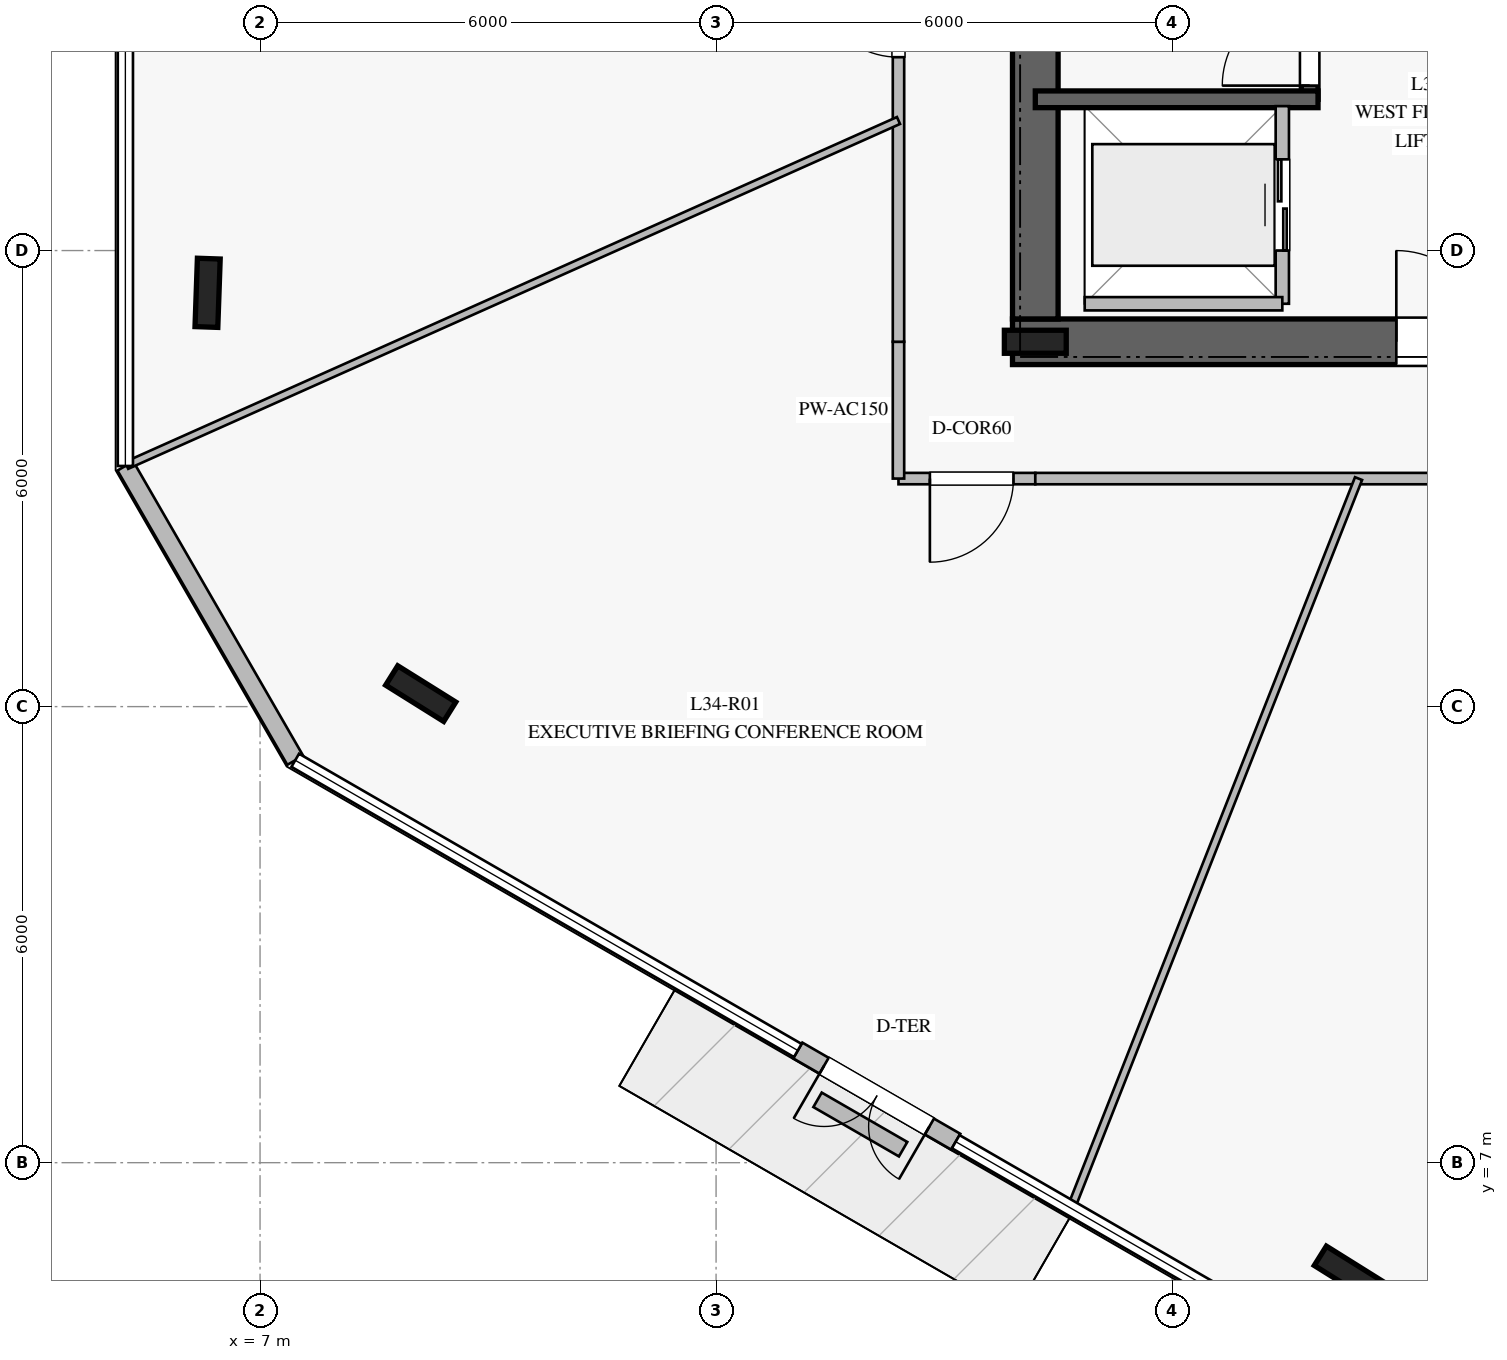
"""IFC4 building model, lengths in metres.
Left out: names, types, materials, properties, quantities, classifications, styles, units other than length and angle.
Written with IfcOpenShell. Run it as: python <this file> out.ifc"""

import sys

from ifc_helpers import new_model, si_unit, direction, frame, frame_2d, origin, origin_2d, place, context, subcontext, project, spatial, rectangle, i_section, extrude, element, fill, save


model = new_model("IFC4")
c1 = context("Model", 3, precision=1e-05, world=origin(), true_north=direction((0.0, 1.0)))
c2 = subcontext(c1, "Body", "Model", "MODEL_VIEW")
j1 = project(units=[si_unit("LENGTHUNIT", "METRE"), si_unit("PLANEANGLEUNIT", "RADIAN")], contexts=[c1])
p1 = place(None, origin())
s1 = spatial("IfcSite", under=j1, at=p1, CompositionType="ELEMENT")
p2 = place(p1, origin())
s2 = spatial("IfcBuilding", under=s1, at=p2, CompositionType="ELEMENT")
p3 = place(p2, frame((0.0, 0.0, 142.4)))
s3 = spatial("IfcBuildingStorey", under=s2, at=p3, CompositionType="ELEMENT", Elevation=142.4)
p4 = place(p3, frame((16.9, 17.8, 0.0), z_axis=(0.0, 0.0, 1.0), x_axis=(1.0, 0.0, 0.0)))
e1 = element("IfcWall", 1, at=p4, inside=s3, PredefinedType="SHEAR", context=c2, shape_type="SweptSolid", body=[
    extrude(rectangle(XDim=16.2, YDim=0.6, at=frame_2d((8.1, 0.0))), origin(), (0.0, 0.0, 1.0), 3.76),
])
p5 = place(p4, frame((5.05, 0.0, 0.0)))
e2 = element("IfcOpeningElement", 2, at=p5, cuts=e1, PredefinedType="OPENING", context=c2, shape_type="SweptSolid", body=[
    extrude(rectangle(XDim=1.2, YDim=2.25, at=frame_2d((0.6, 1.125))), frame((0.0, 0.31, 0.0), z_axis=(0.0, -1.0, 0.0), x_axis=(1.0, 0.0, 0.0)), (0.0, 0.0, 1.0), 0.62),
])
p6 = place(p4, frame((14.0, 0.0, 0.0)))
e3 = element("IfcOpeningElement", 3, at=p6, cuts=e1, PredefinedType="OPENING", context=c2, shape_type="SweptSolid", body=[
    extrude(rectangle(XDim=0.9, YDim=2.1, at=frame_2d((0.45, 1.05))), frame((0.0, 0.31, 0.0), z_axis=(0.0, -1.0, 0.0), x_axis=(1.0, 0.0, 0.0)), (0.0, 0.0, 1.0), 0.62),
])
p7 = place(p4, frame((9.25, 0.0, 0.0)))
e4 = element("IfcOpeningElement", 4, at=p7, cuts=e1, PredefinedType="OPENING", context=c2, shape_type="SweptSolid", body=[
    extrude(rectangle(XDim=1.1, YDim=2.2, at=frame_2d((0.55, 1.1))), frame((0.0, 0.31, 0.0), z_axis=(0.0, -1.0, 0.0), x_axis=(1.0, 0.0, 0.0)), (0.0, 0.0, 1.0), 0.62),
])
p8 = place(p3, frame((17.2, 31.9, 0.0), z_axis=(0.0, 0.0, 1.0), x_axis=(0.0, -1.0, 0.0)))
e5 = element("IfcWall", 5, at=p8, inside=s3, PredefinedType="SHEAR", context=c2, shape_type="SweptSolid", body=[
    extrude(rectangle(XDim=13.8, YDim=0.6, at=frame_2d((6.9, 0.0))), origin(), (0.0, 0.0, 1.0), 3.76),
])
p9 = place(p8, frame((2.05, 0.0, 0.0)))
e6 = element("IfcOpeningElement", 6, at=p9, cuts=e5, PredefinedType="OPENING", context=c2, shape_type="SweptSolid", body=[
    extrude(rectangle(XDim=1.5, YDim=2.2, at=frame_2d((0.75, 1.1))), frame((0.0, 0.31, 0.0), z_axis=(0.0, -1.0, 0.0), x_axis=(1.0, 0.0, 0.0)), (0.0, 0.0, 1.0), 0.62),
])
p10 = place(p3, frame((17.2, 17.8, 0.0), z_axis=(0.0, 0.0, 1.0), x_axis=(1.0, 0.0, 0.0)))
e7 = element("IfcColumn", 7, at=p10, inside=s3, PredefinedType="COLUMN", context=c2, shape_type="SweptSolid", body=[
    extrude(i_section(OverallWidth=0.303, OverallDepth=0.814, WebThickness=0.021, FlangeThickness=0.04, at=origin_2d()), origin(), (0.0, 0.0, 1.0), 4.0),
])
p11 = place(p3, frame((20.81, 20.99, 0.0), z_axis=(0.0, 0.0, 1.0), x_axis=(0.0, 1.0, 0.0)))
e8 = element("IfcWall", 8, at=p11, inside=s3, PredefinedType="SOLIDWALL", context=c2, shape_type="SweptSolid", body=[
    extrude(rectangle(XDim=7.22, YDim=0.22, at=frame_2d((3.61, 0.0))), origin(), (0.0, 0.0, 1.0), 3.76),
])
p12 = place(p11, frame((0.18, 0.0, 0.0)))
e9 = element("IfcOpeningElement", 9, at=p12, cuts=e8, PredefinedType="OPENING", context=c2, shape_type="SweptSolid", body=[
    extrude(rectangle(XDim=1.15, YDim=2.2, at=frame_2d((0.575, 1.1))), frame((0.0, 0.12, 0.0), z_axis=(0.0, -1.0, 0.0), x_axis=(1.0, 0.0, 0.0)), (0.0, 0.0, 1.0), 0.24),
])
p13 = place(p3, frame((17.2, 20.99, 0.0), z_axis=(0.0, 0.0, 1.0), x_axis=(1.0, 0.0, 0.0)))
e10 = element("IfcWall", 10, at=p13, inside=s3, PredefinedType="SOLIDWALL", context=c2, shape_type="SweptSolid", body=[
    extrude(rectangle(XDim=3.72, YDim=0.22, at=frame_2d((1.86, 0.0))), origin(), (0.0, 0.0, 1.0), 3.76),
])
for number, where, z_axis, x_axis in (
    (11, (6.31, 18.444, 0.0), (0.0, 0.0, 1.0), (0.035, 0.999, 0.0)),
    (12, (9.114, 13.171, 0.0), (0.0, 0.0, 1.0), (-0.848, 0.53, 0.0)),
    (13, (21.332, 5.536, 0.0), (0.0, 0.0, 1.0), (-0.848, 0.53, 0.0)),
):
    element("IfcColumn", number, at=place(p3, frame(where, z_axis=z_axis, x_axis=x_axis)), inside=s3, PredefinedType="COLUMN", context=c2, shape_type="SweptSolid", body=[
        extrude(i_section(OverallWidth=0.3, OverallDepth=0.9, WebThickness=0.019, FlangeThickness=0.035, at=origin_2d()), origin(), (0.0, 0.0, 1.0), 4.0),
    ])
p14 = place(p3, frame((5.228, 16.166, 0.0), z_axis=(0.0, 0.0, 1.0), x_axis=(0.499886330694, -0.866091020843, 0.0)))
e14 = element("IfcWall", 14, at=p14, inside=s3, PredefinedType="STANDARD", context=c2, shape_type="SweptSolid", body=[
    extrude(rectangle(XDim=4.471, YDim=0.24, at=frame_2d((2.235, 0.0))), origin(), (0.0, 0.0, 1.0), 3.76),
])
p15 = place(p3, frame((14.075, 8.476, 0.0), z_axis=(0.0, 0.0, 1.0), x_axis=(0.865955154139, -0.50012165622, 0.0)))
e15 = element("IfcWall", 15, at=p15, inside=s3, PredefinedType="STANDARD", context=c2, shape_type="SweptSolid", body=[
    extrude(rectangle(XDim=2.4, YDim=0.24, at=frame_2d((1.2, 0.0))), origin(), (0.0, 0.0, 1.0), 3.76),
])
p16 = place(p15, frame((0.4, 0.0, 0.0)))
e16 = element("IfcOpeningElement", 16, at=p16, cuts=e15, PredefinedType="OPENING", context=c2, shape_type="SweptSolid", body=[
    extrude(rectangle(XDim=1.6, YDim=2.25, at=frame_2d((0.8, 1.125))), frame((0.0, 0.13, 0.0), z_axis=(0.0, -1.0, 0.0), x_axis=(1.0, 0.0, 0.0)), (0.0, 0.0, 1.0), 0.26),
])
p17 = place(p3, frame((14.335, 7.827, 0.0), z_axis=(0.0, 0.0, 1.0), x_axis=(0.866085525409, -0.49989585183, 0.0)))
e17 = element("IfcWall", 17, at=p17, inside=s3, PredefinedType="USERDEFINED", context=c2, shape_type="SweptSolid", body=[
    extrude(rectangle(XDim=1.3, YDim=0.22, at=frame_2d((0.65, 0.0))), origin(), (0.0, 0.0, 1.0), 0.4),
])
p18 = place(p3, frame((20.45, 18.3, 0.0), z_axis=(0.0, 0.0, 1.0), x_axis=(0.0, 1.0, 0.0)))
e18 = element("IfcWall", 18, at=p18, inside=s3, PredefinedType="PARTITIONING", context=c2, shape_type="SweptSolid", body=[
    extrude(rectangle(XDim=2.6, YDim=0.175, at=frame_2d((1.3, 0.0))), origin(), (0.0, 0.0, 1.0), 3.76),
])
p19 = place(p18, frame((0.7, 0.0, 0.0)))
e19 = element("IfcOpeningElement", 19, at=p19, cuts=e18, PredefinedType="OPENING", context=c2, shape_type="SweptSolid", body=[
    extrude(rectangle(XDim=1.2, YDim=2.2, at=frame_2d((0.6, 1.1))), frame((0.0, 0.098, 0.0), z_axis=(0.0, -1.0, 0.0), x_axis=(1.0, 0.0, 0.0)), (0.0, 0.0, 1.0), 0.195),
])
p20 = place(p3, frame((17.85, 18.3, 0.0), z_axis=(0.0, 0.0, 1.0), x_axis=(1.0, 0.0, 0.0)))
e20 = element("IfcWall", 20, at=p20, inside=s3, PredefinedType="PARTITIONING", context=c2, shape_type="SweptSolid", body=[
    extrude(rectangle(XDim=2.6, YDim=0.175, at=frame_2d((1.3, 0.0))), origin(), (0.0, 0.0, 1.0), 3.76),
])
p21 = place(p3, frame((17.2, 16.0, 0.0), z_axis=(0.0, 0.0, 1.0), x_axis=(-1.0, 0.0, 0.0)))
e21 = element("IfcWall", 21, at=p21, inside=s3, PredefinedType="PARTITIONING", context=c2, shape_type="SweptSolid", body=[
    extrude(rectangle(XDim=1.8, YDim=0.15, at=frame_2d((0.9, 0.0))), origin(), (0.0, 0.0, 1.0), 3.36),
])
p22 = place(p21, frame((0.287, 0.0, 0.0)))
e22 = element("IfcOpeningElement", 22, at=p22, cuts=e21, PredefinedType="OPENING", context=c2, shape_type="SweptSolid", body=[
    extrude(rectangle(XDim=1.1, YDim=2.2, at=frame_2d((0.55, 1.1))), frame((0.0, 0.085, 0.0), z_axis=(0.0, -1.0, 0.0), x_axis=(1.0, 0.0, 0.0)), (0.0, 0.0, 1.0), 0.17),
])
p23 = place(p3, frame((15.4, 16.0, 0.0), z_axis=(0.0, 0.0, 1.0), x_axis=(0.0, 1.0, 0.0)))
e23 = element("IfcWall", 23, at=p23, inside=s3, PredefinedType="PARTITIONING", context=c2, shape_type="SweptSolid", body=[
    extrude(rectangle(XDim=1.8, YDim=0.15, at=frame_2d((0.9, 0.0))), origin(), (0.0, 0.0, 1.0), 3.21),
])
p24 = place(p3, frame((15.4, 17.8, 0.0), z_axis=(0.0, 0.0, 1.0), x_axis=(0.0, 1.0, 0.0)))
e24 = element("IfcWall", 24, at=p24, inside=s3, PredefinedType="PARTITIONING", context=c2, shape_type="SweptSolid", body=[
    extrude(rectangle(XDim=6.25, YDim=0.15, at=frame_2d((3.125, 0.0))), origin(), (0.0, 0.0, 1.0), 3.21),
])
p25 = place(p24, frame((3.744, 0.0, 0.0)))
e25 = element("IfcOpeningElement", 25, at=p25, cuts=e24, PredefinedType="OPENING", context=c2, shape_type="SweptSolid", body=[
    extrude(rectangle(XDim=1.1, YDim=2.2, at=frame_2d((0.55, 1.1))), frame((0.0, 0.085, 0.0), z_axis=(0.0, -1.0, 0.0), x_axis=(1.0, 0.0, 0.0)), (0.0, 0.0, 1.0), 0.17),
])
p26 = place(p3, frame((24.05, 16.0, 0.0), z_axis=(0.0, 0.0, 1.0), x_axis=(-1.0, 0.0, 0.0)))
e26 = element("IfcWall", 26, at=p26, inside=s3, PredefinedType="PARTITIONING", context=c2, shape_type="SweptSolid", body=[
    extrude(rectangle(XDim=6.85, YDim=0.15, at=frame_2d((3.425, 0.0))), origin(), (0.0, 0.0, 1.0), 3.21),
])
p27 = place(p3, frame((15.4, 20.711, 0.0), z_axis=(0.0, 0.0, 1.0), x_axis=(-0.913021408502, -0.407911641924, 0.0)))
e27 = element("IfcWall", 27, at=p27, inside=s3, PredefinedType="MOVABLE", context=c2, shape_type="SweptSolid", body=[
    extrude(rectangle(XDim=11.122, YDim=0.1, at=frame_2d((5.561, 0.0))), origin(), (0.0, 0.0, 1.0), 3.16),
])
p28 = place(p3, frame((21.453, 16.0, 0.0), z_axis=(0.0, 0.0, 1.0), x_axis=(-0.366670004264, -0.930351067056, 0.0)))
e28 = element("IfcWall", 28, at=p28, inside=s3, PredefinedType="MOVABLE", context=c2, shape_type="SweptSolid", body=[
    extrude(rectangle(XDim=10.301, YDim=0.1, at=frame_2d((5.15, 0.0))), origin(), (0.0, 0.0, 1.0), 3.16),
])
p29 = place(p16, frame((1.6, 0.0, 0.0), z_axis=(0.0, 0.0, 1.0), x_axis=(-1.0, 0.0, 0.0)))
e29 = element("IfcDoor", 29, at=p29, inside=s3, OperationType="DOUBLE_DOOR_SINGLE_SWING", PredefinedType="DOOR", context=c2, shape_type="SweptSolid", body=[
    extrude(rectangle(XDim=1.6, YDim=2.25, at=frame_2d((0.8, 1.125))), frame((0.0, 0.025, 0.0), z_axis=(0.0, -1.0, 0.0), x_axis=(1.0, 0.0, 0.0)), (0.0, 0.0, 1.0), 0.05),
])
fill(e16, e29)
p30 = place(p12, origin())
e30 = element("IfcDoor", 30, at=p30, inside=s3, OperationType="SINGLE_SWING_LEFT", PredefinedType="DOOR", context=c2, shape_type="SweptSolid", body=[
    extrude(rectangle(XDim=1.15, YDim=2.2, at=frame_2d((0.575, 1.1))), frame((0.0, 0.025, 0.0), z_axis=(0.0, -1.0, 0.0), x_axis=(1.0, 0.0, 0.0)), (0.0, 0.0, 1.0), 0.05),
])
fill(e9, e30)
p31 = place(p5, origin())
e31 = element("IfcDoor", 31, at=p31, inside=s3, OperationType="SINGLE_SWING_LEFT", PredefinedType="DOOR", context=c2, shape_type="SweptSolid", body=[
    extrude(rectangle(XDim=1.2, YDim=2.25, at=frame_2d((0.6, 1.125))), frame((0.0, 0.025, 0.0), z_axis=(0.0, -1.0, 0.0), x_axis=(1.0, 0.0, 0.0)), (0.0, 0.0, 1.0), 0.05),
])
fill(e2, e31)
p32 = place(p19, origin())
e32 = element("IfcDoor", 32, at=p32, inside=s3, OperationType="DOUBLE_DOOR_SLIDING", PredefinedType="DOOR", context=c2, shape_type="SweptSolid", body=[
    extrude(rectangle(XDim=1.2, YDim=2.2, at=frame_2d((0.6, 1.1))), frame((0.0, 0.025, 0.0), z_axis=(0.0, -1.0, 0.0), x_axis=(1.0, 0.0, 0.0)), (0.0, 0.0, 1.0), 0.05),
])
fill(e19, e32)
p33 = place(p22, origin())
e33 = element("IfcDoor", 33, at=p33, inside=s3, OperationType="SINGLE_SWING_RIGHT", PredefinedType="DOOR", context=c2, shape_type="SweptSolid", body=[
    extrude(rectangle(XDim=1.1, YDim=2.2, at=frame_2d((0.55, 1.1))), frame((0.0, 0.025, 0.0), z_axis=(0.0, -1.0, 0.0), x_axis=(1.0, 0.0, 0.0)), (0.0, 0.0, 1.0), 0.05),
])
fill(e22, e33)
p34 = place(p25, origin())
e34 = element("IfcDoor", 34, at=p34, inside=s3, OperationType="SINGLE_SWING_RIGHT", PredefinedType="DOOR", context=c2, shape_type="SweptSolid", body=[
    extrude(rectangle(XDim=1.1, YDim=2.2, at=frame_2d((0.55, 1.1))), frame((0.0, 0.025, 0.0), z_axis=(0.0, -1.0, 0.0), x_axis=(1.0, 0.0, 0.0)), (0.0, 0.0, 1.0), 0.05),
])
fill(e25, e34)
save(model, sys.argv[1])
